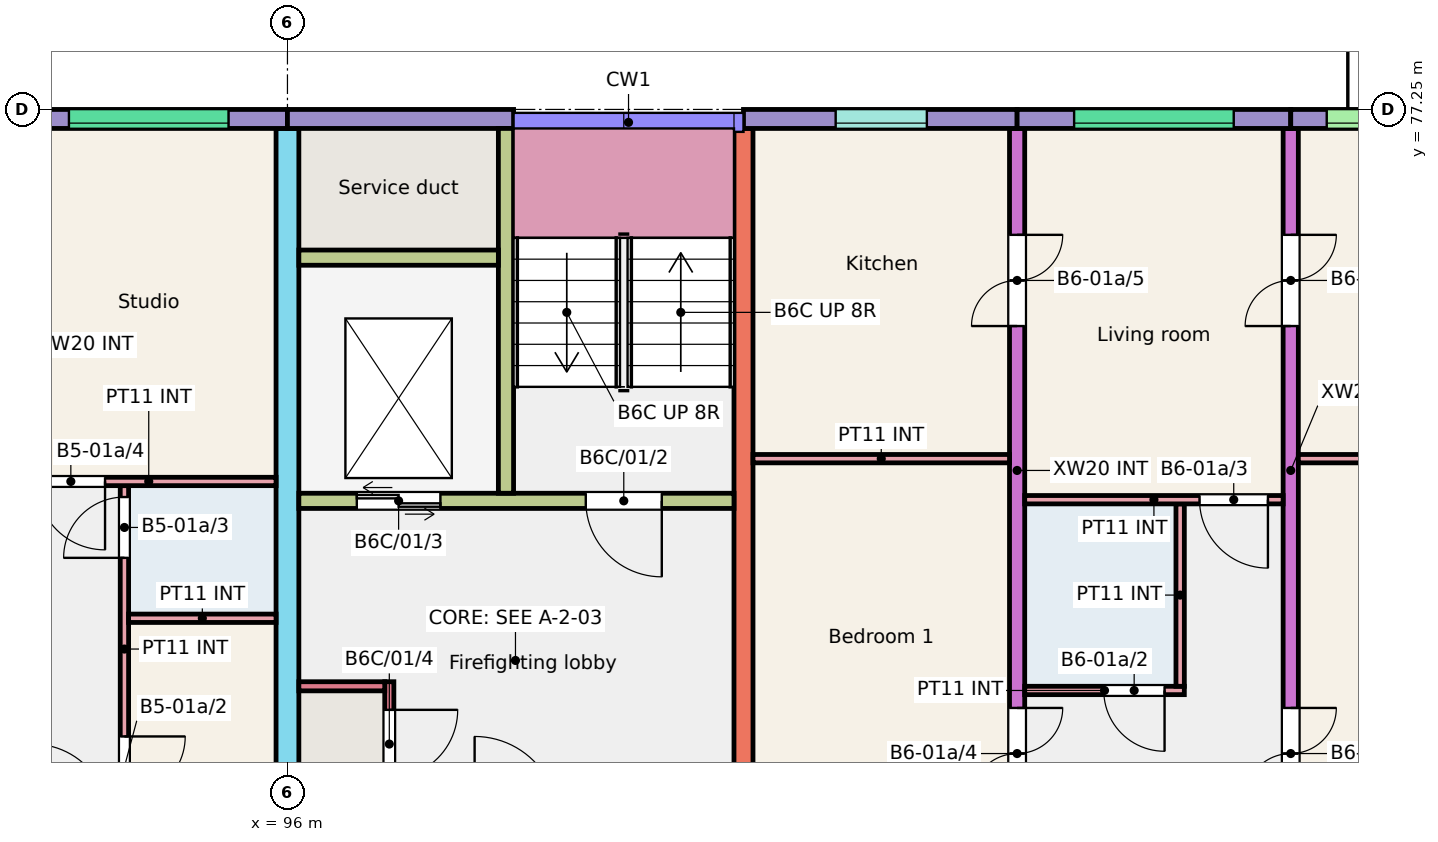
"""IFC4 building model, lengths in metres.
Left out: names, types, materials, properties, quantities, classifications, styles, units other than length and angle.
Written with IfcOpenShell. Run it as: python <this file> out.ifc"""

import sys

from ifc_helpers import new_model, si_unit, direction, frame, frame_2d, origin, place, context, subcontext, project, spatial, rectangle, extrude, element, fill, save


model = new_model("IFC4")
c1 = context("Model", 3, precision=1e-05, world=origin(), true_north=direction((0.0, 1.0)))
c2 = subcontext(c1, "Body", "Model", "MODEL_VIEW")
j1 = project(units=[si_unit("LENGTHUNIT", "METRE"), si_unit("PLANEANGLEUNIT", "RADIAN")], contexts=[c1])
p1 = place(None, origin())
s1 = spatial("IfcSite", under=j1, at=p1, CompositionType="ELEMENT")
p2 = place(p1, origin())
s2 = spatial("IfcBuilding", under=s1, at=p2, CompositionType="ELEMENT")
p3 = place(p2, frame((0.0, 0.0, 3.0)))
s3 = spatial("IfcBuildingStorey", under=s2, at=p3, CompositionType="ELEMENT", Elevation=3.0)
p4 = place(p3, frame((96.0, 66.0, 0.0), z_axis=(0.0, 0.0, 1.0), x_axis=(0.0, 1.0, 0.0)))
e1 = element("IfcWall", 1, at=p4, inside=s3, PredefinedType="SHEAR", context=c2, shape_type="SweptSolid", body=[
    extrude(rectangle(XDim=11.0, YDim=0.3, at=frame_2d((5.5, 0.0))), origin(), (0.0, 0.0, 1.0), 3.0),
])
p5 = place(p4, frame((0.3, 0.0, 0.0)))
e2 = element("IfcOpeningElement", 2, at=p5, cuts=e1, PredefinedType="OPENING", context=c2, shape_type="SweptSolid", body=[
    extrude(rectangle(XDim=1.2, YDim=2.1, at=frame_2d((0.6, 1.05))), frame((0.0, 0.16, 0.0), z_axis=(0.0, -1.0, 0.0), x_axis=(1.0, 0.0, 0.0)), (0.0, 0.0, 1.0), 0.32),
])
p6 = place(p3, frame((102.0, 68.0, 0.0), z_axis=(0.0, 0.0, 1.0), x_axis=(0.0, 1.0, 0.0)))
e3 = element("IfcWall", 3, at=p6, inside=s3, PredefinedType="SHEAR", context=c2, shape_type="SweptSolid", body=[
    extrude(rectangle(XDim=9.0, YDim=0.25, at=frame_2d((4.5, 0.0))), origin(), (0.0, 0.0, 1.0), 3.0),
])
p7 = place(p3, frame((105.6, 68.0, 0.0), z_axis=(0.0, 0.0, 1.0), x_axis=(0.0, 1.0, 0.0)))
e4 = element("IfcWall", 4, at=p7, inside=s3, PredefinedType="SHEAR", context=c2, shape_type="SweptSolid", body=[
    extrude(rectangle(XDim=9.0, YDim=0.2, at=frame_2d((4.5, 0.0))), origin(), (0.0, 0.0, 1.0), 3.0),
])
p8 = place(p7, frame((0.175, 0.0, 0.0)))
e5 = element("IfcOpeningElement", 5, at=p8, cuts=e4, PredefinedType="OPENING", context=c2, shape_type="SweptSolid", body=[
    extrude(rectangle(XDim=1.2, YDim=2.1, at=frame_2d((0.6, 1.05))), frame((0.0, 0.11, 0.0), z_axis=(0.0, -1.0, 0.0), x_axis=(1.0, 0.0, 0.0)), (0.0, 0.0, 1.0), 0.22),
])
p9 = place(p7, frame((6.4, 0.0, 0.0)))
e6 = element("IfcOpeningElement", 6, at=p9, cuts=e4, PredefinedType="OPENING", context=c2, shape_type="SweptSolid", body=[
    extrude(rectangle(XDim=1.2, YDim=2.1, at=frame_2d((0.6, 1.05))), frame((0.0, 0.11, 0.0), z_axis=(0.0, -1.0, 0.0), x_axis=(1.0, 0.0, 0.0)), (0.0, 0.0, 1.0), 0.22),
])
p10 = place(p3, frame((109.2, 68.0, 0.0), z_axis=(0.0, 0.0, 1.0), x_axis=(0.0, 1.0, 0.0)))
e7 = element("IfcWall", 7, at=p10, inside=s3, PredefinedType="SHEAR", context=c2, shape_type="SweptSolid", body=[
    extrude(rectangle(XDim=9.0, YDim=0.2, at=frame_2d((4.5, 0.0))), origin(), (0.0, 0.0, 1.0), 3.0),
])
p11 = place(p10, frame((0.175, 0.0, 0.0)))
e8 = element("IfcOpeningElement", 8, at=p11, cuts=e7, PredefinedType="OPENING", context=c2, shape_type="SweptSolid", body=[
    extrude(rectangle(XDim=1.2, YDim=2.1, at=frame_2d((0.6, 1.05))), frame((0.0, 0.11, 0.0), z_axis=(0.0, -1.0, 0.0), x_axis=(1.0, 0.0, 0.0)), (0.0, 0.0, 1.0), 0.22),
])
p12 = place(p10, frame((6.4, 0.0, 0.0)))
e9 = element("IfcOpeningElement", 9, at=p12, cuts=e7, PredefinedType="OPENING", context=c2, shape_type="SweptSolid", body=[
    extrude(rectangle(XDim=1.2, YDim=2.1, at=frame_2d((0.6, 1.05))), frame((0.0, 0.11, 0.0), z_axis=(0.0, -1.0, 0.0), x_axis=(1.0, 0.0, 0.0)), (0.0, 0.0, 1.0), 0.22),
])
p13 = place(p3, frame((92.4, 77.125, 0.0), z_axis=(0.0, 0.0, 1.0), x_axis=(1.0, 0.0, 0.0)))
e10 = element("IfcWall", 10, at=p13, inside=s3, PredefinedType="SOLIDWALL", context=c2, shape_type="SweptSolid", body=[
    extrude(rectangle(XDim=3.6, YDim=0.25, at=frame_2d((1.8, 0.0))), origin(), (0.0, 0.0, 1.0), 3.0),
])
p14 = place(p13, frame((0.725, 0.0, 1.2)))
e11 = element("IfcOpeningElement", 11, at=p14, cuts=e10, PredefinedType="OPENING", context=c2, shape_type="SweptSolid", body=[
    extrude(rectangle(XDim=2.1, YDim=1.2, at=frame_2d((1.05, 0.6))), frame((0.0, 0.135, 0.0), z_axis=(0.0, -1.0, 0.0), x_axis=(1.0, 0.0, 0.0)), (0.0, 0.0, 1.0), 0.27),
])
p15 = place(p3, frame((96.0, 77.125, 0.0), z_axis=(0.0, 0.0, 1.0), x_axis=(1.0, 0.0, 0.0)))
e12 = element("IfcWall", 12, at=p15, inside=s3, PredefinedType="SOLIDWALL", context=c2, shape_type="SweptSolid", body=[
    extrude(rectangle(XDim=2.975, YDim=0.25, at=frame_2d((1.488, 0.0))), origin(), (0.0, 0.0, 1.0), 3.0),
])
p16 = place(p3, frame((96.15, 72.1, 0.0), z_axis=(0.0, 0.0, 1.0), x_axis=(1.0, 0.0, 0.0)))
e13 = element("IfcWall", 13, at=p16, inside=s3, PredefinedType="SHEAR", context=c2, shape_type="SweptSolid", body=[
    extrude(rectangle(XDim=5.725, YDim=0.2, at=frame_2d((2.863, 0.0))), origin(), (0.0, 0.0, 1.0), 3.0),
])
p17 = place(p16, frame((3.775, 0.0, 0.0)))
e14 = element("IfcOpeningElement", 14, at=p17, cuts=e13, PredefinedType="OPENING", context=c2, shape_type="SweptSolid", body=[
    extrude(rectangle(XDim=1.0, YDim=2.1, at=frame_2d((0.5, 1.05))), frame((0.0, 0.11, 0.0), z_axis=(0.0, -1.0, 0.0), x_axis=(1.0, 0.0, 0.0)), (0.0, 0.0, 1.0), 0.22),
])
p18 = place(p16, frame((0.762, 0.0, 0.0)))
e15 = element("IfcOpeningElement", 15, at=p18, cuts=e13, PredefinedType="OPENING", context=c2, shape_type="SweptSolid", body=[
    extrude(rectangle(XDim=1.1, YDim=2.1, at=frame_2d((0.55, 1.05))), frame((0.0, 0.11, 0.0), z_axis=(0.0, -1.0, 0.0), x_axis=(1.0, 0.0, 0.0)), (0.0, 0.0, 1.0), 0.22),
])
p19 = place(p3, frame((98.875, 72.2, 0.0), z_axis=(0.0, 0.0, 1.0), x_axis=(0.0, 1.0, 0.0)))
e16 = element("IfcWall", 16, at=p19, inside=s3, PredefinedType="SHEAR", context=c2, shape_type="SweptSolid", body=[
    extrude(rectangle(XDim=4.8, YDim=0.2, at=frame_2d((2.4, 0.0))), origin(), (0.0, 0.0, 1.0), 3.0),
])
p20 = place(p3, frame((96.15, 75.3, 0.0), z_axis=(0.0, 0.0, 1.0), x_axis=(1.0, 0.0, 0.0)))
e17 = element("IfcWall", 17, at=p20, inside=s3, PredefinedType="SHEAR", context=c2, shape_type="SweptSolid", body=[
    extrude(rectangle(XDim=2.625, YDim=0.2, at=frame_2d((1.312, 0.0))), origin(), (0.0, 0.0, 1.0), 3.0),
])
p21 = place(p3, frame((97.34, 68.0, 0.0), z_axis=(0.0, 0.0, 1.0), x_axis=(0.0, 1.0, 0.0)))
e18 = element("IfcWall", 18, at=p21, inside=s3, PredefinedType="SHEAR", context=c2, shape_type="SweptSolid", body=[
    extrude(rectangle(XDim=1.72, YDim=0.12, at=frame_2d((0.86, 0.0))), origin(), (0.0, 0.0, 1.0), 3.0),
])
p22 = place(p21, frame((0.45, 0.0, 0.0)))
e19 = element("IfcOpeningElement", 19, at=p22, cuts=e18, PredefinedType="OPENING", context=c2, shape_type="SweptSolid", body=[
    extrude(rectangle(XDim=0.9, YDim=2.1, at=frame_2d((0.45, 1.05))), frame((0.0, 0.07, 0.0), z_axis=(0.0, -1.0, 0.0), x_axis=(1.0, 0.0, 0.0)), (0.0, 0.0, 1.0), 0.14),
])
p23 = place(p3, frame((96.15, 69.66, 0.0), z_axis=(0.0, 0.0, 1.0), x_axis=(1.0, 0.0, 0.0)))
e20 = element("IfcWall", 20, at=p23, inside=s3, PredefinedType="SHEAR", context=c2, shape_type="SweptSolid", body=[
    extrude(rectangle(XDim=1.13, YDim=0.12, at=frame_2d((0.565, 0.0))), origin(), (0.0, 0.0, 1.0), 3.0),
])
p24 = place(p3, frame((102.0, 77.125, 0.0), z_axis=(0.0, 0.0, 1.0), x_axis=(1.0, 0.0, 0.0)))
e21 = element("IfcWall", 21, at=p24, inside=s3, PredefinedType="SOLIDWALL", context=c2, shape_type="SweptSolid", body=[
    extrude(rectangle(XDim=3.6, YDim=0.25, at=frame_2d((1.8, 0.0))), origin(), (0.0, 0.0, 1.0), 3.0),
])
p25 = place(p24, frame((1.212, 0.0, 1.1)))
e22 = element("IfcOpeningElement", 22, at=p25, cuts=e21, PredefinedType="OPENING", context=c2, shape_type="SweptSolid", body=[
    extrude(rectangle(XDim=1.2, YDim=1.3, at=frame_2d((0.6, 0.65))), frame((0.0, 0.135, 0.0), z_axis=(0.0, -1.0, 0.0), x_axis=(1.0, 0.0, 0.0)), (0.0, 0.0, 1.0), 0.27),
])
p26 = place(p3, frame((105.6, 77.125, 0.0), z_axis=(0.0, 0.0, 1.0), x_axis=(1.0, 0.0, 0.0)))
e23 = element("IfcWall", 23, at=p26, inside=s3, PredefinedType="SOLIDWALL", context=c2, shape_type="SweptSolid", body=[
    extrude(rectangle(XDim=3.6, YDim=0.25, at=frame_2d((1.8, 0.0))), origin(), (0.0, 0.0, 1.0), 3.0),
])
p27 = place(p26, frame((0.75, 0.0, 1.2)))
e24 = element("IfcOpeningElement", 24, at=p27, cuts=e23, PredefinedType="OPENING", context=c2, shape_type="SweptSolid", body=[
    extrude(rectangle(XDim=2.1, YDim=1.2, at=frame_2d((1.05, 0.6))), frame((0.0, 0.135, 0.0), z_axis=(0.0, -1.0, 0.0), x_axis=(1.0, 0.0, 0.0)), (0.0, 0.0, 1.0), 0.27),
])
p28 = place(p3, frame((109.2, 77.125, 0.0), z_axis=(0.0, 0.0, 1.0), x_axis=(1.0, 0.0, 0.0)))
e25 = element("IfcWall", 25, at=p28, inside=s3, PredefinedType="SOLIDWALL", context=c2, shape_type="SweptSolid", body=[
    extrude(rectangle(XDim=3.75, YDim=0.25, at=frame_2d((1.875, 0.0))), origin(), (0.0, 0.0, 1.0), 3.0),
])
p29 = place(p28, frame((0.473, 0.0, 1.2)))
e26 = element("IfcOpeningElement", 26, at=p29, cuts=e25, PredefinedType="OPENING", context=c2, shape_type="SweptSolid", body=[
    extrude(rectangle(XDim=1.5, YDim=1.2, at=frame_2d((0.75, 0.6))), frame((0.0, 0.135, 0.0), z_axis=(0.0, -1.0, 0.0), x_axis=(1.0, 0.0, 0.0)), (0.0, 0.0, 1.0), 0.27),
])
p30 = place(p28, frame((2.447, 0.0, 0.0)))
e27 = element("IfcOpeningElement", 27, at=p30, cuts=e25, PredefinedType="OPENING", context=c2, shape_type="SweptSolid", body=[
    extrude(rectangle(XDim=1.0, YDim=2.1, at=frame_2d((0.5, 1.05))), frame((0.0, 0.135, 0.0), z_axis=(0.0, -1.0, 0.0), x_axis=(1.0, 0.0, 0.0)), (0.0, 0.0, 1.0), 0.27),
])
p31 = place(p3, frame((93.855, 68.0, 0.0), z_axis=(0.0, 0.0, 1.0), x_axis=(0.0, 1.0, 0.0)))
e28 = element("IfcWall", 28, at=p31, inside=s3, PredefinedType="PARTITIONING", context=c2, shape_type="SweptSolid", body=[
    extrude(rectangle(XDim=4.3, YDim=0.11, at=frame_2d((2.15, 0.0))), origin(), (0.0, 0.0, 1.0), 2.8),
])
p32 = place(p31, frame((0.2, 0.0, 0.0)))
e29 = element("IfcOpeningElement", 29, at=p32, cuts=e28, PredefinedType="OPENING", context=c2, shape_type="SweptSolid", body=[
    extrude(rectangle(XDim=0.8, YDim=2.1, at=frame_2d((0.4, 1.05))), frame((0.0, 0.065, 0.0), z_axis=(0.0, -1.0, 0.0), x_axis=(1.0, 0.0, 0.0)), (0.0, 0.0, 1.0), 0.13),
])
p33 = place(p31, frame((3.35, 0.0, 0.0)))
e30 = element("IfcOpeningElement", 30, at=p33, cuts=e28, PredefinedType="OPENING", context=c2, shape_type="SweptSolid", body=[
    extrude(rectangle(XDim=0.8, YDim=2.1, at=frame_2d((0.4, 1.05))), frame((0.0, 0.065, 0.0), z_axis=(0.0, -1.0, 0.0), x_axis=(1.0, 0.0, 0.0)), (0.0, 0.0, 1.0), 0.13),
])
p34 = place(p3, frame((93.91, 70.555, 0.0), z_axis=(0.0, 0.0, 1.0), x_axis=(1.0, 0.0, 0.0)))
e31 = element("IfcWall", 31, at=p34, inside=s3, PredefinedType="PARTITIONING", context=c2, shape_type="SweptSolid", body=[
    extrude(rectangle(XDim=1.94, YDim=0.11, at=frame_2d((0.97, 0.0))), origin(), (0.0, 0.0, 1.0), 2.8),
])
p35 = place(p3, frame((92.5, 72.355, 0.0), z_axis=(0.0, 0.0, 1.0), x_axis=(1.0, 0.0, 0.0)))
e32 = element("IfcWall", 32, at=p35, inside=s3, PredefinedType="PARTITIONING", context=c2, shape_type="SweptSolid", body=[
    extrude(rectangle(XDim=3.35, YDim=0.11, at=frame_2d((1.675, 0.0))), origin(), (0.0, 0.0, 1.0), 2.8),
])
p36 = place(p35, frame((0.2, 0.0, 0.0)))
e33 = element("IfcOpeningElement", 33, at=p36, cuts=e32, PredefinedType="OPENING", context=c2, shape_type="SweptSolid", body=[
    extrude(rectangle(XDim=0.9, YDim=2.1, at=frame_2d((0.45, 1.05))), frame((0.0, 0.065, 0.0), z_axis=(0.0, -1.0, 0.0), x_axis=(1.0, 0.0, 0.0)), (0.0, 0.0, 1.0), 0.13),
])
p37 = place(p3, frame((105.7, 69.605, 0.0), z_axis=(0.0, 0.0, 1.0), x_axis=(1.0, 0.0, 0.0)))
e34 = element("IfcWall", 34, at=p37, inside=s3, PredefinedType="PARTITIONING", context=c2, shape_type="SweptSolid", body=[
    extrude(rectangle(XDim=2.1, YDim=0.11, at=frame_2d((1.05, 0.0))), origin(), (0.0, 0.0, 1.0), 2.8),
])
p38 = place(p37, frame((1.04, 0.0, 0.0)))
e35 = element("IfcOpeningElement", 35, at=p38, cuts=e34, PredefinedType="OPENING", context=c2, shape_type="SweptSolid", body=[
    extrude(rectangle(XDim=0.8, YDim=2.1, at=frame_2d((0.4, 1.05))), frame((0.0, 0.065, 0.0), z_axis=(0.0, -1.0, 0.0), x_axis=(1.0, 0.0, 0.0)), (0.0, 0.0, 1.0), 0.13),
])
p39 = place(p3, frame((107.745, 69.66, 0.0), z_axis=(0.0, 0.0, 1.0), x_axis=(0.0, 1.0, 0.0)))
e36 = element("IfcWall", 36, at=p39, inside=s3, PredefinedType="PARTITIONING", context=c2, shape_type="SweptSolid", body=[
    extrude(rectangle(XDim=2.4, YDim=0.11, at=frame_2d((1.2, 0.0))), origin(), (0.0, 0.0, 1.0), 2.8),
])
p40 = place(p3, frame((105.7, 72.115, 0.0), z_axis=(0.0, 0.0, 1.0), x_axis=(1.0, 0.0, 0.0)))
e37 = element("IfcWall", 37, at=p40, inside=s3, PredefinedType="PARTITIONING", context=c2, shape_type="SweptSolid", body=[
    extrude(rectangle(XDim=3.4, YDim=0.11, at=frame_2d((1.7, 0.0))), origin(), (0.0, 0.0, 1.0), 2.8),
])
p41 = place(p40, frame((2.3, 0.0, 0.0)))
e38 = element("IfcOpeningElement", 38, at=p41, cuts=e37, PredefinedType="OPENING", context=c2, shape_type="SweptSolid", body=[
    extrude(rectangle(XDim=0.9, YDim=2.1, at=frame_2d((0.45, 1.05))), frame((0.0, 0.065, 0.0), z_axis=(0.0, -1.0, 0.0), x_axis=(1.0, 0.0, 0.0)), (0.0, 0.0, 1.0), 0.13),
])
p42 = place(p3, frame((102.125, 72.655, 0.0), z_axis=(0.0, 0.0, 1.0), x_axis=(1.0, 0.0, 0.0)))
e39 = element("IfcWall", 39, at=p42, inside=s3, PredefinedType="PARTITIONING", context=c2, shape_type="SweptSolid", body=[
    extrude(rectangle(XDim=3.375, YDim=0.11, at=frame_2d((1.688, 0.0))), origin(), (0.0, 0.0, 1.0), 2.8),
])
p43 = place(p3, frame((109.3, 72.655, 0.0), z_axis=(0.0, 0.0, 1.0), x_axis=(1.0, 0.0, 0.0)))
e40 = element("IfcWall", 40, at=p43, inside=s3, PredefinedType="PARTITIONING", context=c2, shape_type="SweptSolid", body=[
    extrude(rectangle(XDim=3.35, YDim=0.11, at=frame_2d((1.675, 0.0))), origin(), (0.0, 0.0, 1.0), 2.8),
])
p44 = place(p14, origin())
e41 = element("IfcWindow", 41, at=p44, inside=s3, PartitioningType="SINGLE_PANEL", PredefinedType="WINDOW", context=c2, shape_type="SweptSolid", body=[
    extrude(rectangle(XDim=2.1, YDim=1.2, at=frame_2d((1.05, 0.6))), frame((0.0, -0.025, 0.0), z_axis=(0.0, -1.0, 0.0), x_axis=(1.0, 0.0, 0.0)), (0.0, 0.0, 1.0), 0.06),
])
fill(e11, e41)
p45 = place(p25, origin())
e42 = element("IfcWindow", 42, at=p45, inside=s3, PartitioningType="SINGLE_PANEL", PredefinedType="WINDOW", context=c2, shape_type="SweptSolid", body=[
    extrude(rectangle(XDim=1.2, YDim=1.3, at=frame_2d((0.6, 0.65))), frame((0.0, -0.025, 0.0), z_axis=(0.0, -1.0, 0.0), x_axis=(1.0, 0.0, 0.0)), (0.0, 0.0, 1.0), 0.06),
])
fill(e22, e42)
p46 = place(p29, origin())
e43 = element("IfcWindow", 43, at=p46, inside=s3, PartitioningType="SINGLE_PANEL", PredefinedType="WINDOW", context=c2, shape_type="SweptSolid", body=[
    extrude(rectangle(XDim=1.5, YDim=1.2, at=frame_2d((0.75, 0.6))), frame((0.0, -0.025, 0.0), z_axis=(0.0, -1.0, 0.0), x_axis=(1.0, 0.0, 0.0)), (0.0, 0.0, 1.0), 0.06),
])
fill(e26, e43)
p47 = place(p27, origin())
e44 = element("IfcWindow", 44, at=p47, inside=s3, PartitioningType="SINGLE_PANEL", PredefinedType="WINDOW", context=c2, shape_type="SweptSolid", body=[
    extrude(rectangle(XDim=2.1, YDim=1.2, at=frame_2d((1.05, 0.6))), frame((0.0, -0.025, 0.0), z_axis=(0.0, -1.0, 0.0), x_axis=(1.0, 0.0, 0.0)), (0.0, 0.0, 1.0), 0.06),
])
fill(e24, e44)
p48 = place(p32, origin())
e45 = element("IfcDoor", 45, at=p48, inside=s3, OperationType="SINGLE_SWING_RIGHT", PredefinedType="DOOR", context=c2, shape_type="SweptSolid", body=[
    extrude(rectangle(XDim=0.8, YDim=2.1, at=frame_2d((0.4, 1.05))), frame((0.0, 0.025, 0.0), z_axis=(0.0, -1.0, 0.0), x_axis=(1.0, 0.0, 0.0)), (0.0, 0.0, 1.0), 0.05),
])
fill(e29, e45)
p49 = place(p33, origin())
e46 = element("IfcDoor", 46, at=p49, inside=s3, OperationType="SINGLE_SWING_LEFT", PredefinedType="DOOR", context=c2, shape_type="SweptSolid", body=[
    extrude(rectangle(XDim=0.8, YDim=2.1, at=frame_2d((0.4, 1.05))), frame((0.0, 0.025, 0.0), z_axis=(0.0, -1.0, 0.0), x_axis=(1.0, 0.0, 0.0)), (0.0, 0.0, 1.0), 0.05),
])
fill(e30, e46)
p50 = place(p36, origin())
e47 = element("IfcDoor", 47, at=p50, inside=s3, OperationType="SINGLE_SWING_RIGHT", PredefinedType="DOOR", context=c2, shape_type="SweptSolid", body=[
    extrude(rectangle(XDim=0.9, YDim=2.1, at=frame_2d((0.45, 1.05))), frame((0.0, 0.025, 0.0), z_axis=(0.0, -1.0, 0.0), x_axis=(1.0, 0.0, 0.0)), (0.0, 0.0, 1.0), 0.05),
])
fill(e33, e47)
p51 = place(p38, origin())
e48 = element("IfcDoor", 48, at=p51, inside=s3, OperationType="SINGLE_SWING_RIGHT", PredefinedType="DOOR", context=c2, shape_type="SweptSolid", body=[
    extrude(rectangle(XDim=0.8, YDim=2.1, at=frame_2d((0.4, 1.05))), frame((0.0, 0.025, 0.0), z_axis=(0.0, -1.0, 0.0), x_axis=(1.0, 0.0, 0.0)), (0.0, 0.0, 1.0), 0.05),
])
fill(e35, e48)
p52 = place(p41, origin())
e49 = element("IfcDoor", 49, at=p52, inside=s3, OperationType="SINGLE_SWING_RIGHT", PredefinedType="DOOR", context=c2, shape_type="SweptSolid", body=[
    extrude(rectangle(XDim=0.9, YDim=2.1, at=frame_2d((0.45, 1.05))), frame((0.0, 0.025, 0.0), z_axis=(0.0, -1.0, 0.0), x_axis=(1.0, 0.0, 0.0)), (0.0, 0.0, 1.0), 0.05),
])
fill(e38, e49)
p53 = place(p8, origin())
e50 = element("IfcDoor", 50, at=p53, inside=s3, OperationType="DOUBLE_DOOR_SINGLE_SWING", PredefinedType="DOOR", context=c2, shape_type="SweptSolid", body=[
    extrude(rectangle(XDim=1.2, YDim=2.1, at=frame_2d((0.6, 1.05))), frame((0.0, 0.025, 0.0), z_axis=(0.0, -1.0, 0.0), x_axis=(1.0, 0.0, 0.0)), (0.0, 0.0, 1.0), 0.05),
])
fill(e5, e50)
p54 = place(p9, origin())
e51 = element("IfcDoor", 51, at=p54, inside=s3, OperationType="DOUBLE_DOOR_SINGLE_SWING", PredefinedType="DOOR", context=c2, shape_type="SweptSolid", body=[
    extrude(rectangle(XDim=1.2, YDim=2.1, at=frame_2d((0.6, 1.05))), frame((0.0, 0.025, 0.0), z_axis=(0.0, -1.0, 0.0), x_axis=(1.0, 0.0, 0.0)), (0.0, 0.0, 1.0), 0.05),
])
fill(e6, e51)
p55 = place(p11, origin())
e52 = element("IfcDoor", 52, at=p55, inside=s3, OperationType="DOUBLE_DOOR_SINGLE_SWING", PredefinedType="DOOR", context=c2, shape_type="SweptSolid", body=[
    extrude(rectangle(XDim=1.2, YDim=2.1, at=frame_2d((0.6, 1.05))), frame((0.0, 0.025, 0.0), z_axis=(0.0, -1.0, 0.0), x_axis=(1.0, 0.0, 0.0)), (0.0, 0.0, 1.0), 0.05),
])
fill(e8, e52)
p56 = place(p12, origin())
e53 = element("IfcDoor", 53, at=p56, inside=s3, OperationType="DOUBLE_DOOR_SINGLE_SWING", PredefinedType="DOOR", context=c2, shape_type="SweptSolid", body=[
    extrude(rectangle(XDim=1.2, YDim=2.1, at=frame_2d((0.6, 1.05))), frame((0.0, 0.025, 0.0), z_axis=(0.0, -1.0, 0.0), x_axis=(1.0, 0.0, 0.0)), (0.0, 0.0, 1.0), 0.05),
])
fill(e9, e53)
p57 = place(p17, origin())
e54 = element("IfcDoor", 54, at=p57, inside=s3, OperationType="SINGLE_SWING_RIGHT", PredefinedType="DOOR", context=c2, shape_type="SweptSolid", body=[
    extrude(rectangle(XDim=1.0, YDim=2.1, at=frame_2d((0.5, 1.05))), frame((0.0, 0.025, 0.0), z_axis=(0.0, -1.0, 0.0), x_axis=(1.0, 0.0, 0.0)), (0.0, 0.0, 1.0), 0.05),
])
fill(e14, e54)
p58 = place(p18, origin())
e55 = element("IfcDoor", 55, at=p58, inside=s3, OperationType="DOUBLE_DOOR_SLIDING", PredefinedType="DOOR", context=c2, shape_type="SweptSolid", body=[
    extrude(rectangle(XDim=1.1, YDim=2.1, at=frame_2d((0.55, 1.05))), frame((0.0, 0.025, 0.0), z_axis=(0.0, -1.0, 0.0), x_axis=(1.0, 0.0, 0.0)), (0.0, 0.0, 1.0), 0.05),
])
fill(e15, e55)
p59 = place(p22, origin())
e56 = element("IfcDoor", 56, at=p59, inside=s3, OperationType="SINGLE_SWING_RIGHT", PredefinedType="DOOR", context=c2, shape_type="SweptSolid", body=[
    extrude(rectangle(XDim=0.9, YDim=2.1, at=frame_2d((0.45, 1.05))), frame((0.0, 0.025, 0.0), z_axis=(0.0, -1.0, 0.0), x_axis=(1.0, 0.0, 0.0)), (0.0, 0.0, 1.0), 0.05),
])
fill(e19, e56)
save(model, sys.argv[1])
